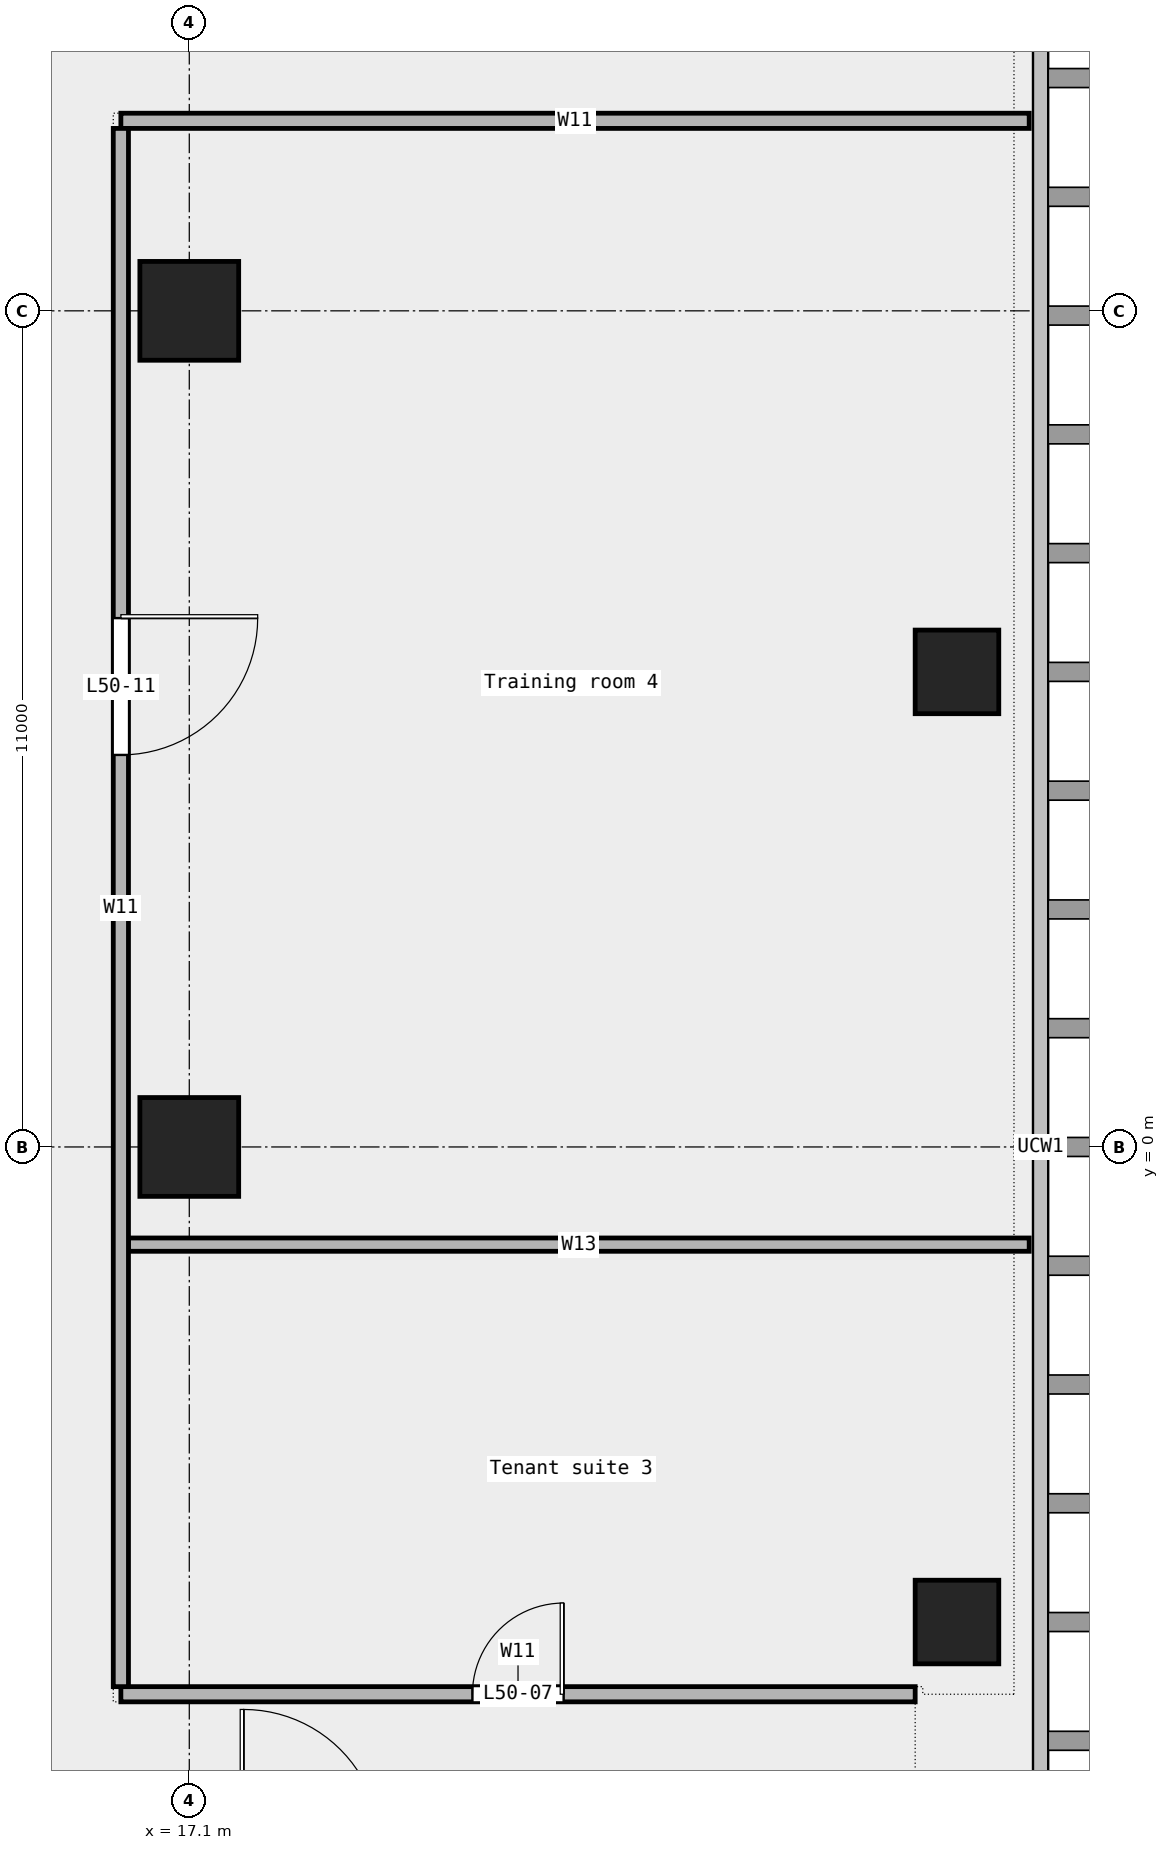
"""IFC4 building model, lengths in metres.
Left out: names, types, materials, properties, quantities, classifications, styles, units other than length and angle.
Written with IfcOpenShell. Run it as: python <this file> out.ifc"""

import sys

from ifc_helpers import new_model, si_unit, direction, frame, frame_2d, origin, origin_2d, place, context, subcontext, project, spatial, rectangle, extrude, element, fill, save


model = new_model("IFC4")
c1 = context("Model", 3, precision=1e-05, world=origin(), true_north=direction((0.0, 1.0)))
c2 = subcontext(c1, "Body", "Model", "MODEL_VIEW")
j1 = project(units=[si_unit("LENGTHUNIT", "METRE"), si_unit("PLANEANGLEUNIT", "RADIAN")], contexts=[c1])
p1 = place(None, origin())
s1 = spatial("IfcSite", under=j1, at=p1, CompositionType="ELEMENT")
p2 = place(p1, origin())
s2 = spatial("IfcBuilding", under=s1, at=p2, CompositionType="ELEMENT")
p3 = place(p2, frame((0.0, 0.0, 235.0)))
s3 = spatial("IfcBuildingStorey", under=s2, at=p3, CompositionType="ELEMENT", Elevation=235.0)
for number, where, z_axis, x_axis in (
    (1, (27.2, -6.25, 0.0), (0.0, 0.0, 1.0), (1.0, 0.0, 0.0)),
    (2, (27.2, 6.25, 0.0), (0.0, 0.0, 1.0), (1.0, 0.0, 0.0)),
):
    element("IfcColumn", number, at=place(p3, frame(where, z_axis=z_axis, x_axis=x_axis)), inside=s3, PredefinedType="COLUMN", context=c2, shape_type="SweptSolid", body=[
        extrude(rectangle(XDim=1.1, YDim=1.1, at=origin_2d()), origin(), (0.0, 0.0, 1.0), 3.6),
    ])
for number, where, z_axis, x_axis in (
    (3, (17.1, 0.0, 0.0), (0.0, 0.0, 1.0), (1.0, 0.0, 0.0)),
    (4, (17.1, 11.0, 0.0), (0.0, 0.0, 1.0), (1.0, 0.0, 0.0)),
):
    element("IfcColumn", number, at=place(p3, frame(where, z_axis=z_axis, x_axis=x_axis)), inside=s3, PredefinedType="COLUMN", context=c2, shape_type="SweptSolid", body=[
        extrude(rectangle(XDim=1.3, YDim=1.3, at=origin_2d()), origin(), (0.0, 0.0, 1.0), 3.6),
    ])
p4 = place(p3, frame((16.2, -7.2, 0.0), z_axis=(0.0, 0.0, 1.0), x_axis=(1.0, 0.0, 0.0)))
e5 = element("IfcWall", 5, at=p4, inside=s3, PredefinedType="PARTITIONING", context=c2, shape_type="SweptSolid", body=[
    extrude(rectangle(XDim=10.45, YDim=0.2, at=frame_2d((5.225, 0.0))), origin(), (0.0, 0.0, 1.0), 3.6),
])
p5 = place(p4, frame((4.625, 0.0, 0.0)))
e6 = element("IfcOpeningElement", 6, at=p5, cuts=e5, PredefinedType="OPENING", context=c2, shape_type="SweptSolid", body=[
    extrude(rectangle(XDim=1.2, YDim=2.1, at=frame_2d((0.6, 1.05))), frame((0.0, 0.112, 0.0), z_axis=(0.0, -1.0, 0.0), x_axis=(1.0, 0.0, 0.0)), (0.0, 0.0, 1.0), 0.224),
])
p6 = place(p3, frame((16.3, -1.285, 0.0), z_axis=(0.0, 0.0, 1.0), x_axis=(1.0, 0.0, 0.0)))
e7 = element("IfcWall", 7, at=p6, inside=s3, PredefinedType="PARTITIONING", context=c2, shape_type="SweptSolid", body=[
    extrude(rectangle(XDim=11.85, YDim=0.175, at=frame_2d((5.925, 0.0))), origin(), (0.0, 0.0, 1.0), 3.6),
])
p7 = place(p3, frame((16.2, 13.5, 0.0), z_axis=(0.0, 0.0, 1.0), x_axis=(1.0, 0.0, 0.0)))
e8 = element("IfcWall", 8, at=p7, inside=s3, PredefinedType="PARTITIONING", context=c2, shape_type="SweptSolid", body=[
    extrude(rectangle(XDim=11.95, YDim=0.2, at=frame_2d((5.975, 0.0))), origin(), (0.0, 0.0, 1.0), 3.6),
])
p8 = place(p3, frame((16.2, -7.1, 0.0), z_axis=(0.0, 0.0, 1.0), x_axis=(0.0, 1.0, 0.0)))
e9 = element("IfcWall", 9, at=p8, inside=s3, PredefinedType="PARTITIONING", context=c2, shape_type="SweptSolid", body=[
    extrude(rectangle(XDim=20.5, YDim=0.2, at=frame_2d((10.25, 0.0))), origin(), (0.0, 0.0, 1.0), 3.6),
])
p9 = place(p8, frame((12.258, 0.0, 0.0)))
e10 = element("IfcOpeningElement", 10, at=p9, cuts=e9, PredefinedType="OPENING", context=c2, shape_type="SweptSolid", body=[
    extrude(rectangle(XDim=1.8, YDim=2.1, at=frame_2d((0.9, 1.05))), frame((0.0, 0.112, 0.0), z_axis=(0.0, -1.0, 0.0), x_axis=(1.0, 0.0, 0.0)), (0.0, 0.0, 1.0), 0.224),
])
p10 = place(p5, origin())
e11 = element("IfcDoor", 11, at=p10, inside=s3, OperationType="SINGLE_SWING_RIGHT", PredefinedType="DOOR", context=c2, shape_type="SweptSolid", body=[
    extrude(rectangle(XDim=1.2, YDim=2.1, at=frame_2d((0.6, 1.05))), frame((0.0, 0.025, 0.0), z_axis=(0.0, -1.0, 0.0), x_axis=(1.0, 0.0, 0.0)), (0.0, 0.0, 1.0), 0.05),
])
fill(e6, e11)
p11 = place(p9, origin())
e12 = element("IfcDoor", 12, at=p11, inside=s3, OperationType="DOUBLE_DOOR_SINGLE_SWING", PredefinedType="DOOR", context=c2, shape_type="SweptSolid", body=[
    extrude(rectangle(XDim=1.8, YDim=2.1, at=frame_2d((0.9, 1.05))), frame((0.0, 0.025, 0.0), z_axis=(0.0, -1.0, 0.0), x_axis=(1.0, 0.0, 0.0)), (0.0, 0.0, 1.0), 0.05),
])
fill(e10, e12)
save(model, sys.argv[1])
